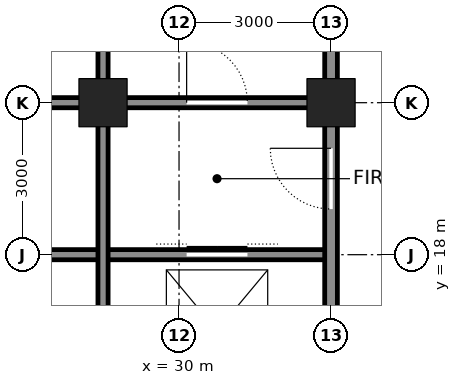
"""IFC4 building model, lengths in metres.
Left out: names, types, materials, properties, quantities, classifications, styles, units other than length and angle.
Written with IfcOpenShell. Run it as: python <this file> out.ifc"""

import sys

from ifc_helpers import new_model, si_unit, direction, frame, frame_2d, origin, origin_2d, place, context, subcontext, project, spatial, rectangle, hollow_rectangle, extrude, element, fill, save


model = new_model("IFC4")
c1 = context("Model", 3, precision=1e-05, world=origin(), true_north=direction((0.0, 1.0)))
c2 = subcontext(c1, "Body", "Model", "MODEL_VIEW")
j1 = project(units=[si_unit("LENGTHUNIT", "METRE"), si_unit("PLANEANGLEUNIT", "RADIAN")], contexts=[c1])
p1 = place(None, origin())
s1 = spatial("IfcSite", under=j1, at=p1, CompositionType="ELEMENT")
p2 = place(p1, origin())
s2 = spatial("IfcBuilding", under=s1, at=p2, CompositionType="ELEMENT")
p3 = place(p2, frame((0.0, 0.0, -5.0)))
s3 = spatial("IfcBuildingStorey", under=s2, at=p3, CompositionType="ELEMENT", Elevation=-5.0)
for number, where, z_axis, x_axis in (
    (1, (33.0, 21.0, -0.3), (0.0, 0.0, 1.0), (1.0, 0.0, 0.0)),
    (2, (28.5, 21.0, -0.3), (0.0, 0.0, 1.0), (1.0, 0.0, 0.0)),
):
    element("IfcColumn", number, at=place(p3, frame(where, z_axis=z_axis, x_axis=x_axis)), inside=s3, PredefinedType="COLUMN", context=c2, shape_type="SweptSolid", body=[
        extrude(hollow_rectangle(XDim=0.95, YDim=0.95, WallThickness=0.095, at=origin_2d()), origin(), (0.0, 0.0, 1.0), 5.3),
    ])
p4 = place(p3, frame((25.5, 18.0, 0.0), z_axis=(0.0, 0.0, 1.0), x_axis=(1.0, 0.0, 0.0)))
e3 = element("IfcWall", 3, at=p4, inside=s3, PredefinedType="SOLIDWALL", context=c2, shape_type="SweptSolid", body=[
    extrude(rectangle(XDim=7.5, YDim=0.2, at=frame_2d((3.75, 0.0))), origin(), (0.0, 0.0, 1.0), 4.8),
])
p5 = place(p4, frame((4.65, 0.0, 0.0)))
e4 = element("IfcOpeningElement", 4, at=p5, cuts=e3, PredefinedType="OPENING", context=c2, shape_type="SweptSolid", body=[
    extrude(rectangle(XDim=1.2, YDim=2.1, at=frame_2d((0.6, 1.05))), frame((0.0, 0.11, 0.0), z_axis=(0.0, -1.0, 0.0), x_axis=(1.0, 0.0, 0.0)), (0.0, 0.0, 1.0), 0.22),
])
p6 = place(p3, frame((25.5, 21.0, 0.0), z_axis=(0.0, 0.0, 1.0), x_axis=(1.0, 0.0, 0.0)))
e5 = element("IfcWall", 5, at=p6, inside=s3, PredefinedType="SOLIDWALL", context=c2, shape_type="SweptSolid", body=[
    extrude(rectangle(XDim=2.75, YDim=0.2, at=frame_2d((1.375, 0.0))), origin(), (0.0, 0.0, 1.0), 3.85),
])
p7 = place(p3, frame((28.75, 21.0, 0.0), z_axis=(0.0, 0.0, 1.0), x_axis=(1.0, 0.0, 0.0)))
e6 = element("IfcWall", 6, at=p7, inside=s3, PredefinedType="SOLIDWALL", context=c2, shape_type="SweptSolid", body=[
    extrude(rectangle(XDim=4.0, YDim=0.2, at=frame_2d((2.0, 0.0))), origin(), (0.0, 0.0, 1.0), 3.85),
])
p8 = place(p7, frame((1.4, 0.0, 0.0)))
e7 = element("IfcOpeningElement", 7, at=p8, cuts=e6, PredefinedType="OPENING", context=c2, shape_type="SweptSolid", body=[
    extrude(rectangle(XDim=1.2, YDim=2.1, at=frame_2d((0.6, 1.05))), frame((0.0, 0.11, 0.0), z_axis=(0.0, -1.0, 0.0), x_axis=(1.0, 0.0, 0.0)), (0.0, 0.0, 1.0), 0.22),
])
p9 = place(p3, frame((28.5, 12.25, 0.0), z_axis=(0.0, 0.0, 1.0), x_axis=(0.0, 1.0, 0.0)))
e8 = element("IfcWall", 8, at=p9, inside=s3, PredefinedType="SOLIDWALL", context=c2, shape_type="SweptSolid", body=[
    extrude(rectangle(XDim=8.5, YDim=0.2, at=frame_2d((4.25, 0.0))), origin(), (0.0, 0.0, 1.0), 3.873),
])
p10 = place(p3, frame((28.5, 21.25, 0.0), z_axis=(0.0, 0.0, 1.0), x_axis=(0.0, 1.0, 0.0)))
e9 = element("IfcWall", 9, at=p10, inside=s3, PredefinedType="SOLIDWALL", context=c2, shape_type="SweptSolid", body=[
    extrude(rectangle(XDim=2.5, YDim=0.2, at=frame_2d((1.25, 0.0))), origin(), (0.0, 0.0, 1.0), 3.873),
])
p11 = place(p3, frame((33.0, 12.25, 0.0), z_axis=(0.0, 0.0, 1.0), x_axis=(0.0, 1.0, 0.0)))
e10 = element("IfcWall", 10, at=p11, inside=s3, PredefinedType="SOLIDWALL", context=c2, shape_type="SweptSolid", body=[
    extrude(rectangle(XDim=8.5, YDim=0.25, at=frame_2d((4.25, 0.0))), origin(), (0.0, 0.0, 1.0), 3.873),
])
p12 = place(p11, frame((6.65, 0.0, 0.0)))
e11 = element("IfcOpeningElement", 11, at=p12, cuts=e10, PredefinedType="OPENING", context=c2, shape_type="SweptSolid", body=[
    extrude(rectangle(XDim=1.2, YDim=2.1, at=frame_2d((0.6, 1.05))), frame((0.0, 0.135, 0.0), z_axis=(0.0, -1.0, 0.0), x_axis=(1.0, 0.0, 0.0)), (0.0, 0.0, 1.0), 0.27),
])
p13 = place(p11, frame((0.875, 0.0, 0.0)))
e12 = element("IfcOpeningElement", 12, at=p13, cuts=e10, PredefinedType="OPENING", context=c2, shape_type="SweptSolid", body=[
    extrude(rectangle(XDim=0.75, YDim=2.1, at=frame_2d((0.375, 1.05))), frame((0.0, 0.135, 0.0), z_axis=(0.0, -1.0, 0.0), x_axis=(1.0, 0.0, 0.0)), (0.0, 0.0, 1.0), 0.27),
])
p14 = place(p3, frame((33.0, 21.25, 0.0), z_axis=(0.0, 0.0, 1.0), x_axis=(0.0, 1.0, 0.0)))
e13 = element("IfcWall", 13, at=p14, inside=s3, PredefinedType="SOLIDWALL", context=c2, shape_type="SweptSolid", body=[
    extrude(rectangle(XDim=2.5, YDim=0.25, at=frame_2d((1.25, 0.0))), origin(), (0.0, 0.0, 1.0), 3.873),
])
p15 = place(p8, origin())
e14 = element("IfcDoor", 14, at=p15, inside=s3, OperationType="SINGLE_SWING_LEFT", PredefinedType="DOOR", context=c2, shape_type="SweptSolid", body=[
    extrude(rectangle(XDim=1.2, YDim=2.1, at=frame_2d((0.6, 1.05))), frame((0.0, 0.025, 0.0), z_axis=(0.0, -1.0, 0.0), x_axis=(1.0, 0.0, 0.0)), (0.0, 0.0, 1.0), 0.05),
])
fill(e7, e14)
p16 = place(p12, origin())
e15 = element("IfcDoor", 15, at=p16, inside=s3, OperationType="SINGLE_SWING_RIGHT", PredefinedType="DOOR", context=c2, shape_type="SweptSolid", body=[
    extrude(rectangle(XDim=1.2, YDim=2.1, at=frame_2d((0.6, 1.05))), frame((0.0, 0.025, 0.0), z_axis=(0.0, -1.0, 0.0), x_axis=(1.0, 0.0, 0.0)), (0.0, 0.0, 1.0), 0.05),
])
fill(e11, e15)
p17 = place(p5, origin())
e16 = element("IfcDoor", 16, at=p17, inside=s3, OperationType="DOUBLE_DOOR_SLIDING", PredefinedType="DOOR", context=c2, shape_type="SweptSolid", body=[
    extrude(rectangle(XDim=1.2, YDim=2.1, at=frame_2d((0.6, 1.05))), frame((0.0, 0.025, 0.0), z_axis=(0.0, -1.0, 0.0), x_axis=(1.0, 0.0, 0.0)), (0.0, 0.0, 1.0), 0.05),
])
fill(e4, e16)
save(model, sys.argv[1])
